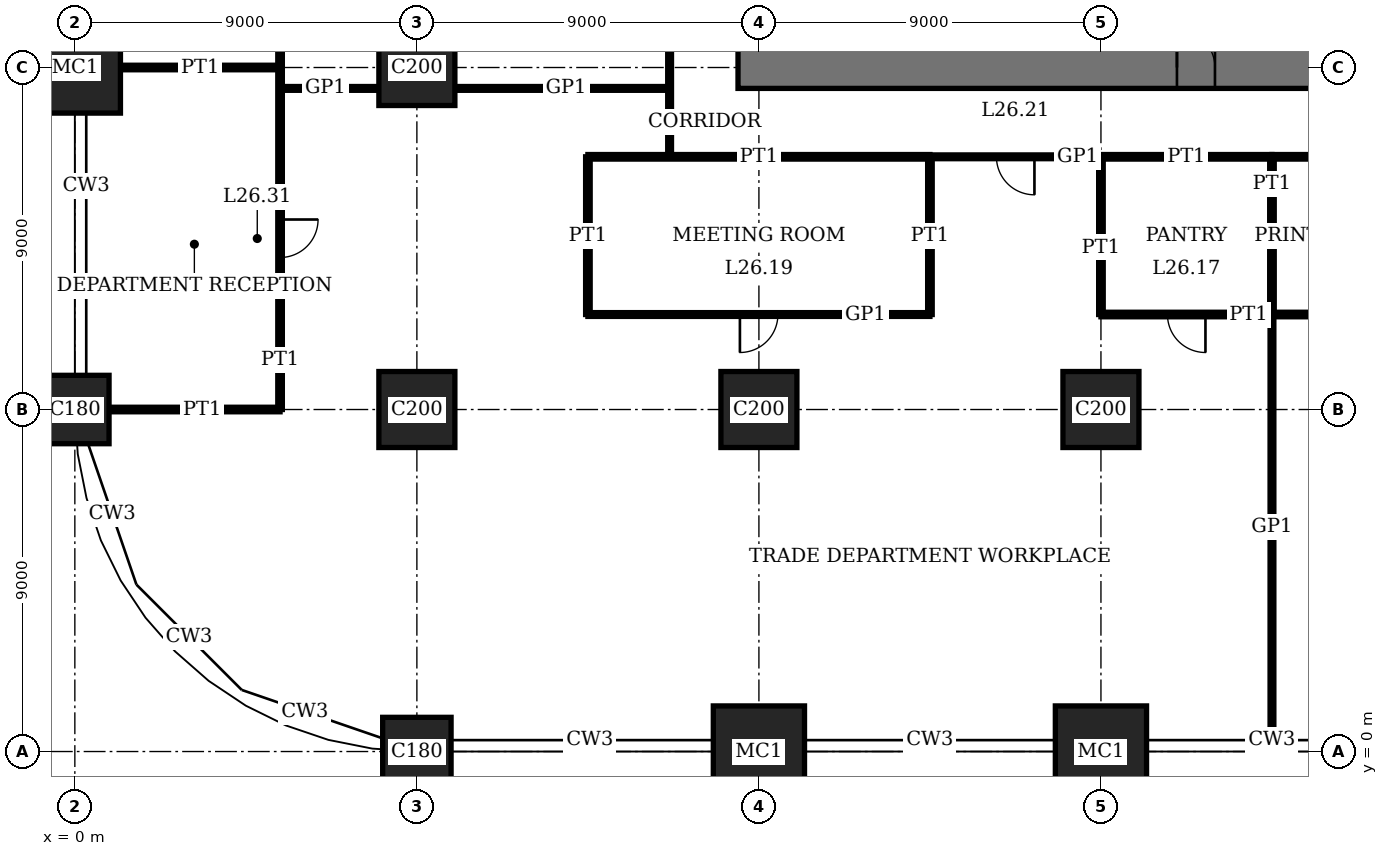
"""IFC4 building model, lengths in metres.
Left out: names, types, materials, properties, quantities, classifications, styles, units other than length and angle.
Written with IfcOpenShell. Run it as: python <this file> out.ifc"""

import sys

from ifc_helpers import new_model, si_unit, direction, frame, frame_2d, origin, origin_2d, place, context, subcontext, project, spatial, rectangle, extrude, element, fill, save


model = new_model("IFC4")
c1 = context("Model", 3, precision=1e-05, world=origin(), true_north=direction((0.0, 1.0)))
c2 = subcontext(c1, "Body", "Model", "MODEL_VIEW")
j1 = project(units=[si_unit("LENGTHUNIT", "METRE"), si_unit("PLANEANGLEUNIT", "RADIAN")], contexts=[c1])
p1 = place(None, origin())
s1 = spatial("IfcSite", under=j1, at=p1, CompositionType="ELEMENT")
p2 = place(p1, origin())
s2 = spatial("IfcBuilding", under=s1, at=p2, CompositionType="ELEMENT")
p3 = place(p2, frame((0.0, 0.0, 109.0)))
s3 = spatial("IfcBuildingStorey", under=s2, at=p3, CompositionType="ELEMENT", Elevation=109.0)
p4 = place(p3, frame((0.0, 9.0, 0.0), z_axis=(0.0, 0.0, 1.0), x_axis=(1.0, 0.0, 0.0)))
e1 = element("IfcColumn", 1, at=p4, inside=s3, PredefinedType="COLUMN", context=c2, shape_type="SweptSolid", body=[
    extrude(rectangle(XDim=1.8, YDim=1.8, at=origin_2d()), origin(), (0.0, 0.0, 1.0), 4.0),
])
p5 = place(p3, frame((0.0, 18.0, 0.0), z_axis=(0.0, 0.0, 1.0), x_axis=(1.0, 0.0, 0.0)))
e2 = element("IfcColumn", 2, at=p5, inside=s3, PredefinedType="COLUMN", context=c2, shape_type="SweptSolid", body=[
    extrude(rectangle(XDim=2.4, YDim=2.4, at=origin_2d()), origin(), (0.0, 0.0, 1.0), 4.0),
])
p6 = place(p3, frame((9.0, 0.0, 0.0), z_axis=(0.0, 0.0, 1.0), x_axis=(1.0, 0.0, 0.0)))
e3 = element("IfcColumn", 3, at=p6, inside=s3, PredefinedType="COLUMN", context=c2, shape_type="SweptSolid", body=[
    extrude(rectangle(XDim=1.8, YDim=1.8, at=origin_2d()), origin(), (0.0, 0.0, 1.0), 4.0),
])
for number, where, z_axis, x_axis in (
    (4, (9.0, 9.0, 0.0), (0.0, 0.0, 1.0), (1.0, 0.0, 0.0)),
    (5, (9.0, 18.0, 0.0), (0.0, 0.0, 1.0), (1.0, 0.0, 0.0)),
):
    element("IfcColumn", number, at=place(p3, frame(where, z_axis=z_axis, x_axis=x_axis)), inside=s3, PredefinedType="COLUMN", context=c2, shape_type="SweptSolid", body=[
        extrude(rectangle(XDim=2.0, YDim=2.0, at=origin_2d()), origin(), (0.0, 0.0, 1.0), 4.0),
    ])
p7 = place(p3, frame((18.0, 0.0, 0.0), z_axis=(0.0, 0.0, 1.0), x_axis=(1.0, 0.0, 0.0)))
e6 = element("IfcColumn", 6, at=p7, inside=s3, PredefinedType="COLUMN", context=c2, shape_type="SweptSolid", body=[
    extrude(rectangle(XDim=2.4, YDim=2.4, at=origin_2d()), origin(), (0.0, 0.0, 1.0), 4.0),
])
p8 = place(p3, frame((18.0, 9.0, 0.0), z_axis=(0.0, 0.0, 1.0), x_axis=(1.0, 0.0, 0.0)))
e7 = element("IfcColumn", 7, at=p8, inside=s3, PredefinedType="COLUMN", context=c2, shape_type="SweptSolid", body=[
    extrude(rectangle(XDim=2.0, YDim=2.0, at=origin_2d()), origin(), (0.0, 0.0, 1.0), 4.0),
])
p9 = place(p3, frame((27.0, 0.0, 0.0), z_axis=(0.0, 0.0, 1.0), x_axis=(1.0, 0.0, 0.0)))
e8 = element("IfcColumn", 8, at=p9, inside=s3, PredefinedType="COLUMN", context=c2, shape_type="SweptSolid", body=[
    extrude(rectangle(XDim=2.4, YDim=2.4, at=origin_2d()), origin(), (0.0, 0.0, 1.0), 4.0),
])
p10 = place(p3, frame((27.0, 9.0, 0.0), z_axis=(0.0, 0.0, 1.0), x_axis=(1.0, 0.0, 0.0)))
e9 = element("IfcColumn", 9, at=p10, inside=s3, PredefinedType="COLUMN", context=c2, shape_type="SweptSolid", body=[
    extrude(rectangle(XDim=2.0, YDim=2.0, at=origin_2d()), origin(), (0.0, 0.0, 1.0), 4.0),
])
p11 = place(p3, frame((17.45, 18.0, 0.0), z_axis=(0.0, 0.0, 1.0), x_axis=(1.0, 0.0, 0.0)))
e10 = element("IfcWall", 10, at=p11, inside=s3, PredefinedType="SHEAR", context=c2, shape_type="SweptSolid", body=[
    extrude(rectangle(XDim=28.1, YDim=1.1, at=frame_2d((14.05, 0.0))), origin(), (0.0, 0.0, 1.0), 4.0),
])
p12 = place(p11, frame((11.55, 0.0, 0.0)))
e11 = element("IfcOpeningElement", 11, at=p12, cuts=e10, PredefinedType="OPENING", context=c2, shape_type="SweptSolid", body=[
    extrude(rectangle(XDim=1.0, YDim=2.4, at=frame_2d((0.5, 1.2))), frame((0.0, 0.56, 0.0), z_axis=(0.0, -1.0, 0.0), x_axis=(1.0, 0.0, 0.0)), (0.0, 0.0, 1.0), 1.12),
])
p13 = place(p11, frame((16.55, 0.0, 0.0)))
e12 = element("IfcOpeningElement", 12, at=p13, cuts=e10, PredefinedType="OPENING", context=c2, shape_type="SweptSolid", body=[
    extrude(rectangle(XDim=1.0, YDim=2.4, at=frame_2d((0.5, 1.2))), frame((0.0, 0.56, 0.0), z_axis=(0.0, -1.0, 0.0), x_axis=(1.0, 0.0, 0.0)), (0.0, 0.0, 1.0), 1.12),
])
p14 = place(p11, frame((20.0, 0.0, 0.0)))
e13 = element("IfcOpeningElement", 13, at=p14, cuts=e10, PredefinedType="OPENING", context=c2, shape_type="SweptSolid", body=[
    extrude(rectangle(XDim=1.1, YDim=2.4, at=frame_2d((0.55, 1.2))), frame((0.0, 0.56, 0.0), z_axis=(0.0, -1.0, 0.0), x_axis=(1.0, 0.0, 0.0)), (0.0, 0.0, 1.0), 1.12),
])
p15 = place(p11, frame((24.05, 0.0, 0.0)))
e14 = element("IfcOpeningElement", 14, at=p15, cuts=e10, PredefinedType="OPENING", context=c2, shape_type="SweptSolid", body=[
    extrude(rectangle(XDim=1.0, YDim=2.4, at=frame_2d((0.5, 1.2))), frame((0.0, 0.56, 0.0), z_axis=(0.0, -1.0, 0.0), x_axis=(1.0, 0.0, 0.0)), (0.0, 0.0, 1.0), 1.12),
])
p16 = place(p3, frame((0.9, 9.0, 0.0), z_axis=(0.0, 0.0, 1.0), x_axis=(1.0, 0.0, 0.0)))
e15 = element("IfcWall", 15, at=p16, inside=s3, PredefinedType="PARTITIONING", context=c2, shape_type="SweptSolid", body=[
    extrude(rectangle(XDim=4.5, YDim=0.12, at=frame_2d((2.25, 0.0))), origin(), (0.0, 0.0, 1.0), 3.05),
])
p17 = place(p3, frame((27.0, 11.5, 0.0), z_axis=(0.0, 0.0, 1.0), x_axis=(1.0, 0.0, 0.0)))
e16 = element("IfcWall", 16, at=p17, inside=s3, PredefinedType="PARTITIONING", context=c2, shape_type="SweptSolid", body=[
    extrude(rectangle(XDim=4.5, YDim=0.12, at=frame_2d((2.25, 0.0))), origin(), (0.0, 0.0, 1.0), 3.75),
])
p18 = place(p17, frame((1.75, 0.0, 0.0)))
e17 = element("IfcOpeningElement", 17, at=p18, cuts=e16, PredefinedType="OPENING", context=c2, shape_type="SweptSolid", body=[
    extrude(rectangle(XDim=1.0, YDim=2.4, at=frame_2d((0.5, 1.2))), frame((0.0, 0.07, 0.0), z_axis=(0.0, -1.0, 0.0), x_axis=(1.0, 0.0, 0.0)), (0.0, 0.0, 1.0), 0.14),
])
p19 = place(p3, frame((31.5, 11.5, 0.0), z_axis=(0.0, 0.0, 1.0), x_axis=(1.0, 0.0, 0.0)))
e18 = element("IfcWall", 18, at=p19, inside=s3, PredefinedType="PARTITIONING", context=c2, shape_type="SweptSolid", body=[
    extrude(rectangle(XDim=4.5, YDim=0.12, at=frame_2d((2.25, 0.0))), origin(), (0.0, 0.0, 1.0), 3.75),
])
p20 = place(p19, frame((1.75, 0.0, 0.0)))
e19 = element("IfcOpeningElement", 19, at=p20, cuts=e18, PredefinedType="OPENING", context=c2, shape_type="SweptSolid", body=[
    extrude(rectangle(XDim=1.0, YDim=2.4, at=frame_2d((0.5, 1.2))), frame((0.0, 0.07, 0.0), z_axis=(0.0, -1.0, 0.0), x_axis=(1.0, 0.0, 0.0)), (0.0, 0.0, 1.0), 0.14),
])
p21 = place(p3, frame((13.5, 11.5, 0.0), z_axis=(0.0, 0.0, 1.0), x_axis=(1.0, 0.0, 0.0)))
e20 = element("IfcWall", 20, at=p21, inside=s3, PredefinedType="PARTITIONING", context=c2, shape_type="SweptSolid", body=[
    extrude(rectangle(XDim=9.0, YDim=0.1, at=frame_2d((4.5, 0.0))), origin(), (0.0, 0.0, 1.0), 3.75),
])
p22 = place(p21, frame((4.0, 0.0, 0.0)))
e21 = element("IfcOpeningElement", 21, at=p22, cuts=e20, PredefinedType="OPENING", context=c2, shape_type="SweptSolid", body=[
    extrude(rectangle(XDim=1.0, YDim=2.4, at=frame_2d((0.5, 1.2))), frame((0.0, 0.06, 0.0), z_axis=(0.0, -1.0, 0.0), x_axis=(1.0, 0.0, 0.0)), (0.0, 0.0, 1.0), 0.12),
])
p23 = place(p3, frame((13.5, 15.65, 0.0), z_axis=(0.0, 0.0, 1.0), x_axis=(1.0, 0.0, 0.0)))
e22 = element("IfcWall", 22, at=p23, inside=s3, PredefinedType="PARTITIONING", context=c2, shape_type="SweptSolid", body=[
    extrude(rectangle(XDim=9.0, YDim=0.12, at=frame_2d((4.5, 0.0))), origin(), (0.0, 0.0, 1.0), 3.75),
])
for number, where, z_axis, x_axis in (
    (23, (27.0, 15.65, 0.0), (0.0, 0.0, 1.0), (1.0, 0.0, 0.0)),
    (24, (31.5, 15.65, 0.0), (0.0, 0.0, 1.0), (1.0, 0.0, 0.0)),
):
    element("IfcWall", number, at=place(p3, frame(where, z_axis=z_axis, x_axis=x_axis)), inside=s3, PredefinedType="PARTITIONING", context=c2, shape_type="SweptSolid", body=[
        extrude(rectangle(XDim=4.5, YDim=0.12, at=frame_2d((2.25, 0.0))), origin(), (0.0, 0.0, 1.0), 3.75),
    ])
p24 = place(p3, frame((22.5, 15.65, 0.0), z_axis=(0.0, 0.0, 1.0), x_axis=(1.0, 0.0, 0.0)))
e25 = element("IfcWall", 25, at=p24, inside=s3, PredefinedType="PARTITIONING", context=c2, shape_type="SweptSolid", body=[
    extrude(rectangle(XDim=4.5, YDim=0.1, at=frame_2d((2.25, 0.0))), origin(), (0.0, 0.0, 1.0), 3.75),
])
p25 = place(p24, frame((1.75, 0.0, 0.0)))
e26 = element("IfcOpeningElement", 26, at=p25, cuts=e25, PredefinedType="OPENING", context=c2, shape_type="SweptSolid", body=[
    extrude(rectangle(XDim=1.0, YDim=2.4, at=frame_2d((0.5, 1.2))), frame((0.0, 0.06, 0.0), z_axis=(0.0, -1.0, 0.0), x_axis=(1.0, 0.0, 0.0)), (0.0, 0.0, 1.0), 0.12),
])
p26 = place(p3, frame((5.39, 17.45, 0.0), z_axis=(0.0, 0.0, 1.0), x_axis=(1.0, 0.0, 0.0)))
e27 = element("IfcWall", 27, at=p26, inside=s3, PredefinedType="PARTITIONING", context=c2, shape_type="SweptSolid", body=[
    extrude(rectangle(XDim=2.61, YDim=0.1, at=frame_2d((1.305, 0.0))), origin(), (0.0, 0.0, 1.0), 3.75),
])
p27 = place(p3, frame((10.0, 17.45, 0.0), z_axis=(0.0, 0.0, 1.0), x_axis=(1.0, 0.0, 0.0)))
e28 = element("IfcWall", 28, at=p27, inside=s3, PredefinedType="PARTITIONING", context=c2, shape_type="SweptSolid", body=[
    extrude(rectangle(XDim=5.65, YDim=0.1, at=frame_2d((2.825, 0.0))), origin(), (0.0, 0.0, 1.0), 3.75),
])
p28 = place(p3, frame((1.2, 18.0, 0.0), z_axis=(0.0, 0.0, 1.0), x_axis=(1.0, 0.0, 0.0)))
e29 = element("IfcWall", 29, at=p28, inside=s3, PredefinedType="PARTITIONING", context=c2, shape_type="SweptSolid", body=[
    extrude(rectangle(XDim=4.2, YDim=0.12, at=frame_2d((2.1, 0.0))), origin(), (0.0, 0.0, 1.0), 3.05),
])
p29 = place(p3, frame((5.4, 9.0, 0.0), z_axis=(0.0, 0.0, 1.0), x_axis=(0.0, 1.0, 0.0)))
e30 = element("IfcWall", 30, at=p29, inside=s3, PredefinedType="PARTITIONING", context=c2, shape_type="SweptSolid", body=[
    extrude(rectangle(XDim=9.0, YDim=0.12, at=frame_2d((4.5, 0.0))), origin(), (0.0, 0.0, 1.0), 3.75),
])
p30 = place(p29, frame((4.0, 0.0, 0.0)))
e31 = element("IfcOpeningElement", 31, at=p30, cuts=e30, PredefinedType="OPENING", context=c2, shape_type="SweptSolid", body=[
    extrude(rectangle(XDim=1.0, YDim=2.4, at=frame_2d((0.5, 1.2))), frame((0.0, 0.07, 0.0), z_axis=(0.0, -1.0, 0.0), x_axis=(1.0, 0.0, 0.0)), (0.0, 0.0, 1.0), 0.14),
])
p31 = place(p3, frame((5.4, 18.0, 0.0), z_axis=(0.0, 0.0, 1.0), x_axis=(0.0, 1.0, 0.0)))
e32 = element("IfcWall", 32, at=p31, inside=s3, PredefinedType="PARTITIONING", context=c2, shape_type="SweptSolid", body=[
    extrude(rectangle(XDim=4.5, YDim=0.12, at=frame_2d((2.25, 0.0))), origin(), (0.0, 0.0, 1.0), 3.75),
])
p32 = place(p31, frame((1.75, 0.0, 0.0)))
e33 = element("IfcOpeningElement", 33, at=p32, cuts=e32, PredefinedType="OPENING", context=c2, shape_type="SweptSolid", body=[
    extrude(rectangle(XDim=1.0, YDim=2.4, at=frame_2d((0.5, 1.2))), frame((0.0, 0.07, 0.0), z_axis=(0.0, -1.0, 0.0), x_axis=(1.0, 0.0, 0.0)), (0.0, 0.0, 1.0), 0.14),
])
p33 = place(p3, frame((13.5, 11.5, 0.0), z_axis=(0.0, 0.0, 1.0), x_axis=(0.0, 1.0, 0.0)))
e34 = element("IfcWall", 34, at=p33, inside=s3, PredefinedType="PARTITIONING", context=c2, shape_type="SweptSolid", body=[
    extrude(rectangle(XDim=4.15, YDim=0.12, at=frame_2d((2.075, 0.0))), origin(), (0.0, 0.0, 1.0), 3.75),
])
p34 = place(p3, frame((15.65, 15.65, 0.0), z_axis=(0.0, 0.0, 1.0), x_axis=(0.0, 1.0, 0.0)))
e35 = element("IfcWall", 35, at=p34, inside=s3, PredefinedType="PARTITIONING", context=c2, shape_type="SweptSolid", body=[
    extrude(rectangle(XDim=20.9, YDim=0.1, at=frame_2d((10.45, 0.0))), origin(), (0.0, 0.0, 1.0), 3.75),
])
p35 = place(p34, frame((9.95, 0.0, 0.0)))
e36 = element("IfcOpeningElement", 36, at=p35, cuts=e35, PredefinedType="OPENING", context=c2, shape_type="SweptSolid", body=[
    extrude(rectangle(XDim=1.0, YDim=2.4, at=frame_2d((0.5, 1.2))), frame((0.0, 0.06, 0.0), z_axis=(0.0, -1.0, 0.0), x_axis=(1.0, 0.0, 0.0)), (0.0, 0.0, 1.0), 0.12),
])
p36 = place(p3, frame((22.5, 11.5, 0.0), z_axis=(0.0, 0.0, 1.0), x_axis=(0.0, 1.0, 0.0)))
e37 = element("IfcWall", 37, at=p36, inside=s3, PredefinedType="PARTITIONING", context=c2, shape_type="SweptSolid", body=[
    extrude(rectangle(XDim=4.15, YDim=0.12, at=frame_2d((2.075, 0.0))), origin(), (0.0, 0.0, 1.0), 3.75),
])
p37 = place(p3, frame((27.0, 11.5, 0.0), z_axis=(0.0, 0.0, 1.0), x_axis=(0.0, 1.0, 0.0)))
e38 = element("IfcWall", 38, at=p37, inside=s3, PredefinedType="PARTITIONING", context=c2, shape_type="SweptSolid", body=[
    extrude(rectangle(XDim=4.15, YDim=0.12, at=frame_2d((2.075, 0.0))), origin(), (0.0, 0.0, 1.0), 3.05),
])
p38 = place(p3, frame((31.5, 11.5, 0.0), z_axis=(0.0, 0.0, 1.0), x_axis=(0.0, 1.0, 0.0)))
e39 = element("IfcWall", 39, at=p38, inside=s3, PredefinedType="PARTITIONING", context=c2, shape_type="SweptSolid", body=[
    extrude(rectangle(XDim=4.15, YDim=0.12, at=frame_2d((2.075, 0.0))), origin(), (0.0, 0.0, 1.0), 3.75),
])
p39 = place(p3, frame((31.5, 0.31, 0.0), z_axis=(0.0, 0.0, 1.0), x_axis=(0.0, 1.0, 0.0)))
e40 = element("IfcWall", 40, at=p39, inside=s3, PredefinedType="PARTITIONING", context=c2, shape_type="SweptSolid", body=[
    extrude(rectangle(XDim=11.19, YDim=0.1, at=frame_2d((5.595, 0.0))), origin(), (0.0, 0.0, 1.0), 3.75),
])
p40 = place(p12, origin())
e41 = element("IfcDoor", 41, at=p40, inside=s3, OperationType="SINGLE_SWING_RIGHT", PredefinedType="DOOR", context=c2, shape_type="SweptSolid", body=[
    extrude(rectangle(XDim=1.0, YDim=2.4, at=frame_2d((0.5, 1.2))), frame((0.0, 0.025, 0.0), z_axis=(0.0, -1.0, 0.0), x_axis=(1.0, 0.0, 0.0)), (0.0, 0.0, 1.0), 0.05),
    extrude(rectangle(XDim=0.04, YDim=2.4, at=frame_2d((0.02, 1.2))), frame((0.0, 0.4, 0.0), z_axis=(0.0, -1.0, 0.0), x_axis=(1.0, 0.0, 0.0)), (0.0, 0.0, 1.0), 0.8),
    extrude(rectangle(XDim=0.04, YDim=2.4, at=frame_2d((0.98, 1.2))), frame((0.0, 0.4, 0.0), z_axis=(0.0, -1.0, 0.0), x_axis=(1.0, 0.0, 0.0)), (0.0, 0.0, 1.0), 0.8),
    extrude(rectangle(XDim=1.0, YDim=0.04, at=frame_2d((0.5, 2.38))), frame((0.0, 0.4, 0.0), z_axis=(0.0, -1.0, 0.0), x_axis=(1.0, 0.0, 0.0)), (0.0, 0.0, 1.0), 0.8),
])
fill(e11, e41)
p41 = place(p18, origin())
e42 = element("IfcDoor", 42, at=p41, inside=s3, OperationType="SINGLE_SWING_RIGHT", PredefinedType="DOOR", context=c2, shape_type="SweptSolid", body=[
    extrude(rectangle(XDim=1.0, YDim=2.4, at=frame_2d((0.5, 1.2))), frame((0.0, 0.025, 0.0), z_axis=(0.0, -1.0, 0.0), x_axis=(1.0, 0.0, 0.0)), (0.0, 0.0, 1.0), 0.05),
])
fill(e17, e42)
p42 = place(p22, origin())
e43 = element("IfcDoor", 43, at=p42, inside=s3, OperationType="SINGLE_SWING_LEFT", PredefinedType="DOOR", context=c2, shape_type="SweptSolid", body=[
    extrude(rectangle(XDim=1.0, YDim=2.4, at=frame_2d((0.5, 1.2))), frame((0.0, 0.02, 0.0), z_axis=(0.0, -1.0, 0.0), x_axis=(1.0, 0.0, 0.0)), (0.0, 0.0, 1.0), 0.04),
])
fill(e21, e43)
p43 = place(p25, origin())
e44 = element("IfcDoor", 44, at=p43, inside=s3, OperationType="SINGLE_SWING_RIGHT", PredefinedType="DOOR", context=c2, shape_type="SweptSolid", body=[
    extrude(rectangle(XDim=1.0, YDim=2.4, at=frame_2d((0.5, 1.2))), frame((0.0, 0.02, 0.0), z_axis=(0.0, -1.0, 0.0), x_axis=(1.0, 0.0, 0.0)), (0.0, 0.0, 1.0), 0.04),
])
fill(e26, e44)
p44 = place(p30, origin())
e45 = element("IfcDoor", 45, at=p44, inside=s3, OperationType="SINGLE_SWING_RIGHT", PredefinedType="DOOR", context=c2, shape_type="SweptSolid", body=[
    extrude(rectangle(XDim=1.0, YDim=2.4, at=frame_2d((0.5, 1.2))), frame((0.0, 0.025, 0.0), z_axis=(0.0, -1.0, 0.0), x_axis=(1.0, 0.0, 0.0)), (0.0, 0.0, 1.0), 0.05),
])
fill(e31, e45)
save(model, sys.argv[1])
